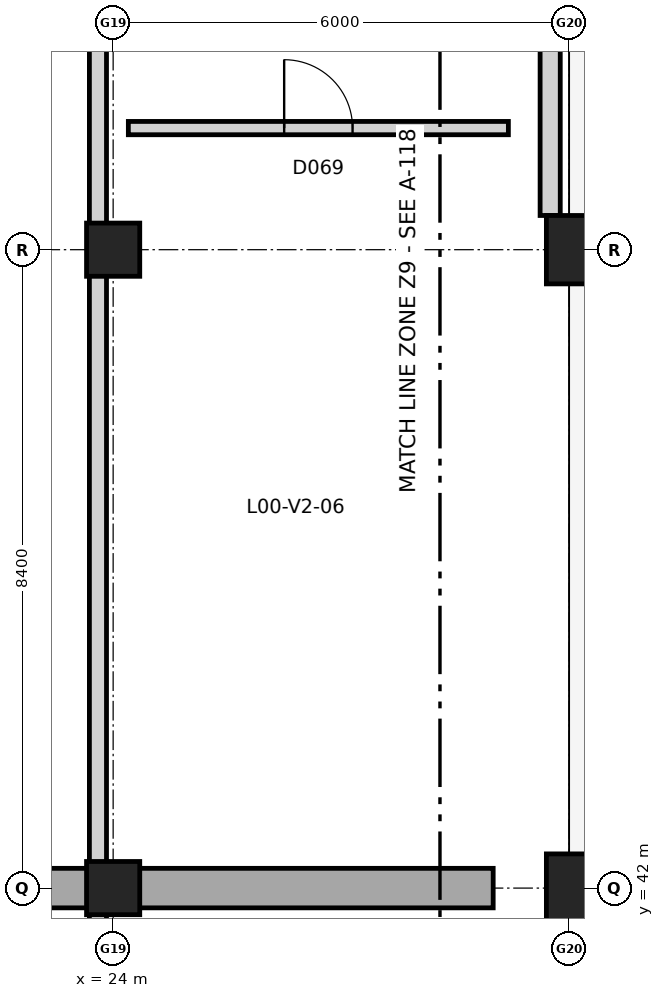
"""IFC4 building model, lengths in metres.
Left out: names, types, materials, properties, quantities, classifications, styles, units other than length and angle.
Written with IfcOpenShell. Run it as: python <this file> out.ifc"""

import sys

from ifc_helpers import new_model, si_unit, direction, frame, frame_2d, origin, origin_2d, place, context, subcontext, project, spatial, rectangle, extrude, element, fill, save


model = new_model("IFC4")
c1 = context("Model", 3, precision=1e-05, world=origin(), true_north=direction((0.0, 1.0)))
c2 = subcontext(c1, "Body", "Model", "MODEL_VIEW")
j1 = project(units=[si_unit("LENGTHUNIT", "METRE"), si_unit("PLANEANGLEUNIT", "RADIAN")], contexts=[c1])
p1 = place(None, origin())
s1 = spatial("IfcSite", under=j1, at=p1, CompositionType="ELEMENT")
p2 = place(p1, origin())
s2 = spatial("IfcBuilding", under=s1, at=p2, CompositionType="ELEMENT")
p3 = place(p2, origin())
s3 = spatial("IfcBuildingStorey", under=s2, at=p3, CompositionType="ELEMENT", Elevation=0.0)
for number, where, z_axis, x_axis in (
    (1, (24.0, 42.0, 0.0), (0.0, 0.0, 1.0), (1.0, 0.0, 0.0)),
    (2, (24.0, 50.4, 0.0), (0.0, 0.0, 1.0), (1.0, 0.0, 0.0)),
):
    element("IfcColumn", number, at=place(p3, frame(where, z_axis=z_axis, x_axis=x_axis)), inside=s3, PredefinedType="COLUMN", context=c2, shape_type="SweptSolid", body=[
        extrude(rectangle(XDim=0.7, YDim=0.7, at=origin_2d()), origin(), (0.0, 0.0, 1.0), 5.4),
    ])
for number, where, z_axis, x_axis in (
    (3, (30.0, 42.0, 0.0), (0.0, 0.0, 1.0), (1.0, 0.0, 0.0)),
    (4, (30.0, 50.4, 0.0), (0.0, 0.0, 1.0), (1.0, 0.0, 0.0)),
):
    element("IfcColumn", number, at=place(p3, frame(where, z_axis=z_axis, x_axis=x_axis)), inside=s3, PredefinedType="COLUMN", context=c2, shape_type="SweptSolid", body=[
        extrude(rectangle(XDim=0.6, YDim=0.9, at=origin_2d()), origin(), (0.0, 0.0, 1.0), 5.4),
    ])
p4 = place(p3, frame((10.0, 42.0, 0.0), z_axis=(0.0, 0.0, 1.0), x_axis=(1.0, 0.0, 0.0)))
e5 = element("IfcWall", 5, at=p4, inside=s3, PredefinedType="SHEAR", context=c2, shape_type="SweptSolid", body=[
    extrude(rectangle(XDim=19.0, YDim=0.52, at=frame_2d((9.5, 0.0))), origin(), (0.0, 0.0, 1.0), 5.4),
])
p5 = place(p3, frame((29.75, 50.85, 5.4), z_axis=(0.0, 0.0, 1.0), x_axis=(0.0, 1.0, 0.0)))
e6 = element("IfcWall", 6, at=p5, inside=s3, PredefinedType="PARAPET", context=c2, shape_type="SweptSolid", body=[
    extrude(rectangle(XDim=8.1, YDim=0.265, at=frame_2d((4.05, 0.0))), origin(), (0.0, 0.0, 1.0), 1.15),
])
p6 = place(p3, frame((23.8, 36.8, 0.0), z_axis=(0.0, 0.0, 1.0), x_axis=(0.0, 1.0, 0.0)))
e7 = element("IfcWall", 7, at=p6, inside=s3, PredefinedType="PARTITIONING", context=c2, shape_type="SweptSolid", body=[
    extrude(rectangle(XDim=21.8, YDim=0.225, at=frame_2d((10.9, 0.0))), origin(), (0.0, 0.0, 1.0), 4.19),
])
p7 = place(p3, frame((24.2, 52.0, 0.0), z_axis=(0.0, 0.0, 1.0), x_axis=(1.0, 0.0, 0.0)))
e8 = element("IfcWall", 8, at=p7, inside=s3, PredefinedType="PARTITIONING", context=c2, shape_type="SweptSolid", body=[
    extrude(rectangle(XDim=5.0, YDim=0.175, at=frame_2d((2.5, 0.0))), origin(), (0.0, 0.0, 1.0), 5.02),
])
p8 = place(p7, frame((2.05, 0.0, 0.0)))
e9 = element("IfcOpeningElement", 9, at=p8, cuts=e8, PredefinedType="OPENING", context=c2, shape_type="SweptSolid", body=[
    extrude(rectangle(XDim=0.9, YDim=2.1, at=frame_2d((0.45, 1.05))), frame((0.0, 0.097, 0.0), z_axis=(0.0, -1.0, 0.0), x_axis=(1.0, 0.0, 0.0)), (0.0, 0.0, 1.0), 0.195),
])
p9 = place(p8, origin())
e10 = element("IfcDoor", 10, at=p9, inside=s3, OperationType="SINGLE_SWING_LEFT", PredefinedType="DOOR", context=c2, shape_type="SweptSolid", body=[
    extrude(rectangle(XDim=0.9, YDim=2.1, at=frame_2d((0.45, 1.05))), frame((0.0, 0.025, 0.0), z_axis=(0.0, -1.0, 0.0), x_axis=(1.0, 0.0, 0.0)), (0.0, 0.0, 1.0), 0.05),
])
fill(e9, e10)
save(model, sys.argv[1])
